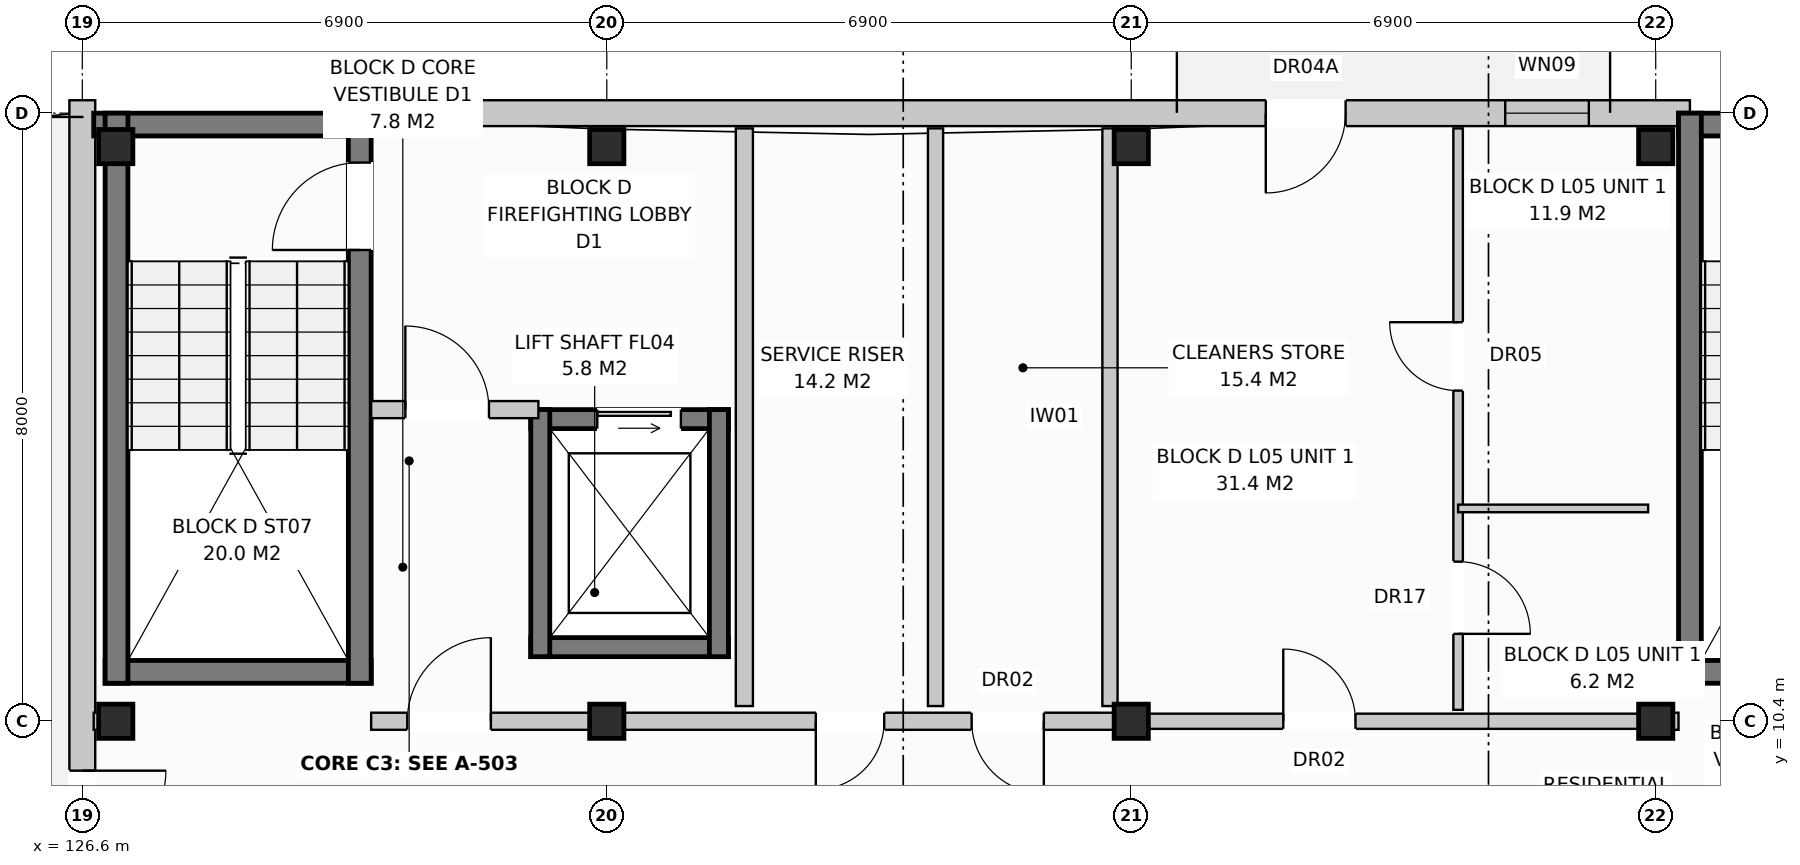
"""IFC4 building model, lengths in metres.
Left out: names, types, materials, properties, quantities, classifications, styles, units other than length and angle.
Written with IfcOpenShell. Run it as: python <this file> out.ifc"""

import sys

from ifc_helpers import new_model, si_unit, direction, frame, frame_2d, origin, origin_with_axes, origin_2d, place, context, subcontext, project, spatial, rectangle, extrude, element, fill, save


model = new_model("IFC4")
c1 = context("Model", 3, precision=1e-05, world=origin(), true_north=direction((0.0, 1.0)))
c2 = subcontext(c1, "Body", "Model", "MODEL_VIEW")
j1 = project(units=[si_unit("LENGTHUNIT", "METRE"), si_unit("PLANEANGLEUNIT", "RADIAN")], contexts=[c1])
p1 = place(None, origin())
s1 = spatial("IfcSite", under=j1, at=p1, CompositionType="ELEMENT")
p2 = place(p1, origin())
s2 = spatial("IfcBuilding", under=s1, at=p2, CompositionType="ELEMENT")
p3 = place(p2, frame((0.0, 0.0, 17.6)))
s3 = spatial("IfcBuildingStorey", under=s2, at=p3, CompositionType="ELEMENT", Elevation=17.6)
for number, where, z_axis, x_axis in (
    (1, (127.04, 10.4, 0.0), (0.0, 0.0, 1.0), (1.0, 0.0, 0.0)),
    (2, (127.04, 17.96, 0.0), (0.0, 0.0, 1.0), (1.0, 0.0, 0.0)),
    (3, (133.5, 10.4, 0.0), (0.0, 0.0, 1.0), (1.0, 0.0, 0.0)),
    (4, (133.5, 17.96, 0.0), (0.0, 0.0, 1.0), (1.0, 0.0, 0.0)),
    (5, (140.4, 10.4, 0.0), (0.0, 0.0, 1.0), (1.0, 0.0, 0.0)),
    (6, (140.4, 17.96, 0.0), (0.0, 0.0, 1.0), (1.0, 0.0, 0.0)),
    (7, (147.3, 10.4, 0.0), (0.0, 0.0, 1.0), (1.0, 0.0, 0.0)),
    (8, (147.3, 17.96, 0.0), (0.0, 0.0, 1.0), (1.0, 0.0, 0.0)),
):
    element("IfcColumn", number, at=place(p3, frame(where, z_axis=z_axis, x_axis=x_axis)), inside=s3, PredefinedType="COLUMN", context=c2, shape_type="SweptSolid", body=[
        extrude(rectangle(XDim=0.45, YDim=0.45, at=origin_2d()), origin(), (0.0, 0.0, 1.0), 3.2),
    ])
p4 = place(p3, frame((130.25, 18.4, 0.0), z_axis=(0.0, 0.0, 1.0), x_axis=(1.0, 0.0, 0.0)))
e9 = element("IfcWall", 9, at=p4, inside=s3, PredefinedType="STANDARD", context=c2, shape_type="SweptSolid", body=[
    extrude(rectangle(XDim=17.5, YDim=0.34, at=frame_2d((8.75, 0.0))), origin(), (0.0, 0.0, 1.0), 2.95),
])
p5 = place(p4, frame((11.92, 0.0, 0.0)))
e10 = element("IfcOpeningElement", 10, at=p5, cuts=e9, PredefinedType="OPENING", context=c2, shape_type="SweptSolid", body=[
    extrude(rectangle(XDim=1.05, YDim=2.12, at=frame_2d((0.525, 1.06))), frame((0.0, 0.182, 0.0), z_axis=(0.0, -1.0, 0.0), x_axis=(1.0, 0.0, 0.0)), (0.0, 0.0, 1.0), 0.364),
])
p6 = place(p4, frame((15.07, 0.0, 0.72)))
e11 = element("IfcOpeningElement", 11, at=p6, cuts=e9, PredefinedType="OPENING", context=c2, shape_type="SweptSolid", body=[
    extrude(rectangle(XDim=1.1, YDim=1.5, at=frame_2d((0.55, 0.75))), frame((0.0, 0.182, 0.0), z_axis=(0.0, -1.0, 0.0), x_axis=(1.0, 0.0, 0.0)), (0.0, 0.0, 1.0), 0.364),
])
p7 = place(p3, frame((126.6, -0.17, 0.0), z_axis=(0.0, 0.0, 1.0), x_axis=(0.0, 1.0, 0.0)))
e12 = element("IfcWall", 12, at=p7, inside=s3, PredefinedType="STANDARD", context=c2, shape_type="SweptSolid", body=[
    extrude(rectangle(XDim=18.74, YDim=0.34, at=frame_2d((9.37, 0.0))), origin(), (0.0, 0.0, 1.0), 2.95),
])
p8 = place(p7, frame((8.82, 0.0, 0.0)))
e13 = element("IfcOpeningElement", 13, at=p8, cuts=e12, PredefinedType="OPENING", context=c2, shape_type="SweptSolid", body=[
    extrude(rectangle(XDim=1.1, YDim=2.1, at=frame_2d((0.55, 1.05))), frame((0.0, 0.182, 0.0), z_axis=(0.0, -1.0, 0.0), x_axis=(1.0, 0.0, 0.0)), (0.0, 0.0, 1.0), 0.364),
])
p9 = place(p7, frame((1.82, 0.0, 0.0)))
e14 = element("IfcOpeningElement", 14, at=p9, cuts=e12, PredefinedType="OPENING", context=c2, shape_type="SweptSolid", body=[
    extrude(rectangle(XDim=1.1, YDim=2.1, at=frame_2d((0.55, 1.05))), frame((0.0, 0.182, 0.0), z_axis=(0.0, -1.0, 0.0), x_axis=(1.0, 0.0, 0.0)), (0.0, 0.0, 1.0), 0.364),
])
p10 = place(p3, frame((126.75, 18.25, 0.0), z_axis=(0.0, 0.0, 1.0), x_axis=(1.0, 0.0, 0.0)))
e15 = element("IfcWall", 15, at=p10, inside=s3, PredefinedType="SHEAR", context=c2, shape_type="SweptSolid", body=[
    extrude(rectangle(XDim=3.65, YDim=0.3, at=frame_2d((1.825, 0.0))), origin(), (0.0, 0.0, 1.0), 2.95),
])
p11 = place(p3, frame((126.9, 11.05, 0.0), z_axis=(0.0, 0.0, 1.0), x_axis=(1.0, 0.0, 0.0)))
e16 = element("IfcWall", 16, at=p11, inside=s3, PredefinedType="SHEAR", context=c2, shape_type="SweptSolid", body=[
    extrude(rectangle(XDim=3.5, YDim=0.3, at=frame_2d((1.75, 0.0))), origin(), (0.0, 0.0, 1.0), 2.95),
])
p12 = place(p3, frame((127.05, 10.9, 0.0), z_axis=(0.0, 0.0, 1.0), x_axis=(0.0, 1.0, 0.0)))
e17 = element("IfcWall", 17, at=p12, inside=s3, PredefinedType="SHEAR", context=c2, shape_type="SweptSolid", body=[
    extrude(rectangle(XDim=7.5, YDim=0.3, at=frame_2d((3.75, 0.0))), origin(), (0.0, 0.0, 1.0), 2.95),
])
p13 = place(p3, frame((130.25, 10.9, 0.0), z_axis=(0.0, 0.0, 1.0), x_axis=(0.0, 1.0, 0.0)))
e18 = element("IfcWall", 18, at=p13, inside=s3, PredefinedType="SHEAR", context=c2, shape_type="SweptSolid", body=[
    extrude(rectangle(XDim=7.5, YDim=0.3, at=frame_2d((3.75, 0.0))), origin(), (0.0, 0.0, 1.0), 2.95),
])
p14 = place(p13, frame((5.7, 0.0, 0.0)))
e19 = element("IfcOpeningElement", 19, at=p14, cuts=e18, PredefinedType="OPENING", context=c2, shape_type="SweptSolid", body=[
    extrude(rectangle(XDim=1.15, YDim=2.15, at=frame_2d((0.575, 1.075))), frame((0.0, 0.162, 0.0), z_axis=(0.0, -1.0, 0.0), x_axis=(1.0, 0.0, 0.0)), (0.0, 0.0, 1.0), 0.324),
])
p15 = place(p3, frame((132.5, 14.375, 0.0), z_axis=(0.0, 0.0, 1.0), x_axis=(1.0, 0.0, 0.0)))
e20 = element("IfcWall", 20, at=p15, inside=s3, PredefinedType="SHEAR", context=c2, shape_type="SweptSolid", body=[
    extrude(rectangle(XDim=2.6, YDim=0.25, at=frame_2d((1.3, 0.0))), origin(), (0.0, 0.0, 1.0), 2.95),
])
p16 = place(p15, frame((0.875, 0.0, 0.0)))
e21 = element("IfcOpeningElement", 21, at=p16, cuts=e20, PredefinedType="OPENING", context=c2, shape_type="SweptSolid", body=[
    extrude(rectangle(XDim=1.1, YDim=2.1, at=frame_2d((0.55, 1.05))), frame((0.0, 0.137, 0.0), z_axis=(0.0, -1.0, 0.0), x_axis=(1.0, 0.0, 0.0)), (0.0, 0.0, 1.0), 0.274),
])
p17 = place(p3, frame((132.5, 11.375, 0.0), z_axis=(0.0, 0.0, 1.0), x_axis=(1.0, 0.0, 0.0)))
e22 = element("IfcWall", 22, at=p17, inside=s3, PredefinedType="SHEAR", context=c2, shape_type="SweptSolid", body=[
    extrude(rectangle(XDim=2.6, YDim=0.25, at=frame_2d((1.3, 0.0))), origin(), (0.0, 0.0, 1.0), 2.95),
])
for number, where, z_axis, x_axis in (
    (23, (132.625, 11.25, 0.0), (0.0, 0.0, 1.0), (0.0, 1.0, 0.0)),
    (24, (134.975, 11.25, 0.0), (0.0, 0.0, 1.0), (0.0, 1.0, 0.0)),
):
    element("IfcWall", number, at=place(p3, frame(where, z_axis=z_axis, x_axis=x_axis)), inside=s3, PredefinedType="SHEAR", context=c2, shape_type="SweptSolid", body=[
        extrude(rectangle(XDim=3.25, YDim=0.25, at=frame_2d((1.625, 0.0))), origin(), (0.0, 0.0, 1.0), 2.95),
    ])
p18 = place(p3, frame((135.31, 10.6, 0.0), z_axis=(0.0, 0.0, 1.0), x_axis=(0.0, 1.0, 0.0)))
e25 = element("IfcWall", 25, at=p18, inside=s3, PredefinedType="PARTITIONING", context=c2, shape_type="SweptSolid", body=[
    extrude(rectangle(XDim=7.6, YDim=0.225, at=frame_2d((3.8, 0.0))), origin(), (0.0, 0.0, 1.0), 2.59),
])
p19 = place(p3, frame((130.4, 14.5, 0.0), z_axis=(0.0, 0.0, 1.0), x_axis=(1.0, 0.0, 0.0)))
e26 = element("IfcWall", 26, at=p19, inside=s3, PredefinedType="PARTITIONING", context=c2, shape_type="SweptSolid", body=[
    extrude(rectangle(XDim=2.2, YDim=0.225, at=frame_2d((1.1, 0.0))), origin(), (0.0, 0.0, 1.0), 2.95),
])
p20 = place(p19, frame((0.45, 0.0, 0.0)))
e27 = element("IfcOpeningElement", 27, at=p20, cuts=e26, PredefinedType="OPENING", context=c2, shape_type="SweptSolid", body=[
    extrude(rectangle(XDim=1.1, YDim=2.15, at=frame_2d((0.55, 1.075))), frame((0.0, 0.125, 0.0), z_axis=(0.0, -1.0, 0.0), x_axis=(1.0, 0.0, 0.0)), (0.0, 0.0, 1.0), 0.249),
])
p21 = place(p3, frame((126.75, 10.4, 0.0), z_axis=(0.0, 0.0, 1.0), x_axis=(1.0, 0.0, 0.0)))
e28 = element("IfcWall", 28, at=p21, inside=s3, PredefinedType="PARTITIONING", context=c2, shape_type="SweptSolid", body=[
    extrude(rectangle(XDim=0.15, YDim=0.225, at=frame_2d((0.075, 0.0))), origin(), (0.0, 0.0, 1.0), 2.95),
])
for number, where, z_axis, x_axis in (
    (29, (137.825, 10.6, 0.0), (0.0, 0.0, 1.0), (0.0, 1.0, 0.0)),
    (30, (140.12, 10.6, 0.0), (0.0, 0.0, 1.0), (0.0, 1.0, 0.0)),
):
    element("IfcWall", number, at=place(p3, frame(where, z_axis=z_axis, x_axis=x_axis)), inside=s3, PredefinedType="PARTITIONING", context=c2, shape_type="SweptSolid", body=[
        extrude(rectangle(XDim=7.6, YDim=0.2, at=frame_2d((3.8, 0.0))), origin(), (0.0, 0.0, 1.0), 2.95),
    ])
p22 = place(p3, frame((130.4, 10.4, 0.0), z_axis=(0.0, 0.0, 1.0), x_axis=(1.0, 0.0, 0.0)))
e31 = element("IfcWall", 31, at=p22, inside=s3, PredefinedType="PARTITIONING", context=c2, shape_type="SweptSolid", body=[
    extrude(rectangle(XDim=10.0, YDim=0.225, at=frame_2d((5.0, 0.0))), origin(), (0.0, 0.0, 1.0), 2.39),
])
p23 = place(p22, frame((0.475, 0.0, 0.0)))
e32 = element("IfcOpeningElement", 32, at=p23, cuts=e31, PredefinedType="OPENING", context=c2, shape_type="SweptSolid", body=[
    extrude(rectangle(XDim=1.1, YDim=2.15, at=frame_2d((0.55, 1.075))), frame((0.0, 0.125, 0.0), z_axis=(0.0, -1.0, 0.0), x_axis=(1.0, 0.0, 0.0)), (0.0, 0.0, 1.0), 0.249),
])
p24 = place(p22, frame((5.85, 0.0, 0.0)))
e33 = element("IfcOpeningElement", 33, at=p24, cuts=e31, PredefinedType="OPENING", context=c2, shape_type="SweptSolid", body=[
    extrude(rectangle(XDim=0.9, YDim=2.1, at=frame_2d((0.45, 1.05))), frame((0.0, 0.125, 0.0), z_axis=(0.0, -1.0, 0.0), x_axis=(1.0, 0.0, 0.0)), (0.0, 0.0, 1.0), 0.249),
])
p25 = place(p22, frame((7.9, 0.0, 0.0)))
e34 = element("IfcOpeningElement", 34, at=p25, cuts=e31, PredefinedType="OPENING", context=c2, shape_type="SweptSolid", body=[
    extrude(rectangle(XDim=0.95, YDim=2.15, at=frame_2d((0.475, 1.075))), frame((0.0, 0.125, 0.0), z_axis=(0.0, -1.0, 0.0), x_axis=(1.0, 0.0, 0.0)), (0.0, 0.0, 1.0), 0.249),
])
for number, where, z_axis, x_axis in (
    (35, (147.6, 18.25, 0.0), (0.0, 0.0, 1.0), (1.0, 0.0, 0.0)),
    (36, (147.6, 11.05, 0.0), (0.0, 0.0, 1.0), (1.0, 0.0, 0.0)),
):
    element("IfcWall", number, at=place(p3, frame(where, z_axis=z_axis, x_axis=x_axis)), inside=s3, PredefinedType="SHEAR", context=c2, shape_type="SweptSolid", body=[
        extrude(rectangle(XDim=3.5, YDim=0.3, at=frame_2d((1.75, 0.0))), origin(), (0.0, 0.0, 1.0), 2.95),
    ])
p26 = place(p3, frame((147.75, 10.9, 0.0), z_axis=(0.0, 0.0, 1.0), x_axis=(0.0, 1.0, 0.0)))
e37 = element("IfcWall", 37, at=p26, inside=s3, PredefinedType="SHEAR", context=c2, shape_type="SweptSolid", body=[
    extrude(rectangle(XDim=7.5, YDim=0.3, at=frame_2d((3.75, 0.0))), origin(), (0.0, 0.0, 1.0), 2.95),
])
p27 = place(p3, frame((147.3, 10.4, 0.0), z_axis=(0.0, 0.0, 1.0), x_axis=(1.0, 0.0, 0.0)))
e38 = element("IfcWall", 38, at=p27, inside=s3, PredefinedType="PARTITIONING", context=c2, shape_type="SweptSolid", body=[
    extrude(rectangle(XDim=0.3, YDim=0.225, at=frame_2d((0.15, 0.0))), origin(), (0.0, 0.0, 1.0), 2.95),
])
p28 = place(p3, frame((140.4, 10.4, 0.0), z_axis=(0.0, 0.0, 1.0), x_axis=(1.0, 0.0, 0.0)))
e39 = element("IfcWall", 39, at=p28, inside=s3, PredefinedType="PARTITIONING", context=c2, shape_type="SweptSolid", body=[
    extrude(rectangle(XDim=6.9, YDim=0.2, at=frame_2d((3.45, 0.0))), origin(), (0.0, 0.0, 1.0), 2.39),
])
p29 = place(p28, frame((2.0, 0.0, 0.0)))
e40 = element("IfcOpeningElement", 40, at=p29, cuts=e39, PredefinedType="OPENING", context=c2, shape_type="SweptSolid", body=[
    extrude(rectangle(XDim=0.95, YDim=2.15, at=frame_2d((0.475, 1.075))), frame((0.0, 0.112, 0.0), z_axis=(0.0, -1.0, 0.0), x_axis=(1.0, 0.0, 0.0)), (0.0, 0.0, 1.0), 0.224),
])
p30 = place(p3, frame((144.7, 10.55, 0.0), z_axis=(0.0, 0.0, 1.0), x_axis=(0.0, 1.0, 0.0)))
e41 = element("IfcWall", 41, at=p30, inside=s3, PredefinedType="PARTITIONING", context=c2, shape_type="SweptSolid", body=[
    extrude(rectangle(XDim=7.65, YDim=0.125, at=frame_2d((3.825, 0.0))), origin(), (0.0, 0.0, 1.0), 2.95),
])
p31 = place(p30, frame((1.0, 0.0, 0.0)))
e42 = element("IfcOpeningElement", 42, at=p31, cuts=e41, PredefinedType="OPENING", context=c2, shape_type="SweptSolid", body=[
    extrude(rectangle(XDim=0.95, YDim=2.1, at=frame_2d((0.475, 1.05))), frame((0.0, 0.074, 0.0), z_axis=(0.0, -1.0, 0.0), x_axis=(1.0, 0.0, 0.0)), (0.0, 0.0, 1.0), 0.149),
])
p32 = place(p30, frame((4.2, 0.0, 0.0)))
e43 = element("IfcOpeningElement", 43, at=p32, cuts=e41, PredefinedType="OPENING", context=c2, shape_type="SweptSolid", body=[
    extrude(rectangle(XDim=0.9, YDim=2.1, at=frame_2d((0.45, 1.05))), frame((0.0, 0.074, 0.0), z_axis=(0.0, -1.0, 0.0), x_axis=(1.0, 0.0, 0.0)), (0.0, 0.0, 1.0), 0.149),
])
p33 = place(p3, frame((144.7, 13.2, 0.0), z_axis=(0.0, 0.0, 1.0), x_axis=(1.0, 0.0, 0.0)))
e44 = element("IfcWall", 44, at=p33, inside=s3, PredefinedType="PARTITIONING", context=c2, shape_type="SweptSolid", body=[
    extrude(rectangle(XDim=2.5, YDim=0.1, at=frame_2d((1.25, 0.0))), origin(), (0.0, 0.0, 1.0), 2.95),
])
p34 = place(p5, frame((1.05, 0.0, 0.0), z_axis=(0.0, 0.0, 1.0), x_axis=(-1.0, 0.0, 0.0)))
e45 = element("IfcDoor", 45, at=p34, inside=s3, OperationType="SINGLE_SWING_LEFT", PredefinedType="DOOR", context=c2, shape_type="SweptSolid", body=[
    extrude(rectangle(XDim=1.05, YDim=2.12, at=frame_2d((0.525, 1.06))), frame((0.0, 0.025, 0.0), z_axis=(0.0, -1.0, 0.0), x_axis=(1.0, 0.0, 0.0)), (0.0, 0.0, 1.0), 0.05),
])
fill(e10, e45)
p35 = place(p6, origin_with_axes())
e46 = element("IfcWindow", 46, at=p35, inside=s3, PartitioningType="SINGLE_PANEL", PredefinedType="WINDOW", context=c2, shape_type="SweptSolid", body=[
    extrude(rectangle(XDim=1.1, YDim=1.5, at=frame_2d((0.55, 0.75))), frame((0.0, 0.03, 0.0), z_axis=(0.0, -1.0, 0.0), x_axis=(1.0, 0.0, 0.0)), (0.0, 0.0, 1.0), 0.06),
])
fill(e11, e46)
p36 = place(p8, frame((1.1, 0.0, 0.0), z_axis=(0.0, 0.0, 1.0), x_axis=(-1.0, 0.0, 0.0)))
e47 = element("IfcDoor", 47, at=p36, inside=s3, OperationType="SINGLE_SWING_RIGHT", PredefinedType="DOOR", context=c2, shape_type="SweptSolid", body=[
    extrude(rectangle(XDim=1.1, YDim=2.1, at=frame_2d((0.55, 1.05))), frame((0.0, 0.025, 0.0), z_axis=(0.0, -1.0, 0.0), x_axis=(1.0, 0.0, 0.0)), (0.0, 0.0, 1.0), 0.05),
])
fill(e13, e47)
p37 = place(p14, origin_with_axes())
e48 = element("IfcDoor", 48, at=p37, inside=s3, OperationType="SINGLE_SWING_LEFT", PredefinedType="DOOR", context=c2, shape_type="SweptSolid", body=[
    extrude(rectangle(XDim=1.15, YDim=2.15, at=frame_2d((0.575, 1.075))), frame((0.0, 0.025, 0.0), z_axis=(0.0, -1.0, 0.0), x_axis=(1.0, 0.0, 0.0)), (0.0, 0.0, 1.0), 0.05),
])
fill(e19, e48)
p38 = place(p16, origin_with_axes())
e49 = element("IfcDoor", 49, at=p38, inside=s3, OperationType="SLIDING_TO_LEFT", PredefinedType="DOOR", context=c2, shape_type="SweptSolid", body=[
    extrude(rectangle(XDim=1.1, YDim=2.1, at=frame_2d((0.55, 1.05))), frame((0.0, 0.025, 0.0), z_axis=(0.0, -1.0, 0.0), x_axis=(1.0, 0.0, 0.0)), (0.0, 0.0, 1.0), 0.05),
])
fill(e21, e49)
p39 = place(p20, origin_with_axes())
e50 = element("IfcDoor", 50, at=p39, inside=s3, OperationType="SINGLE_SWING_LEFT", PredefinedType="DOOR", context=c2, shape_type="SweptSolid", body=[
    extrude(rectangle(XDim=1.1, YDim=2.15, at=frame_2d((0.55, 1.075))), frame((0.0, 0.025, 0.0), z_axis=(0.0, -1.0, 0.0), x_axis=(1.0, 0.0, 0.0)), (0.0, 0.0, 1.0), 0.05),
])
fill(e27, e50)
p40 = place(p23, origin_with_axes())
e51 = element("IfcDoor", 51, at=p40, inside=s3, OperationType="SINGLE_SWING_RIGHT", PredefinedType="DOOR", context=c2, shape_type="SweptSolid", body=[
    extrude(rectangle(XDim=1.1, YDim=2.15, at=frame_2d((0.55, 1.075))), frame((0.0, 0.025, 0.0), z_axis=(0.0, -1.0, 0.0), x_axis=(1.0, 0.0, 0.0)), (0.0, 0.0, 1.0), 0.05),
])
fill(e32, e51)
p41 = place(p24, frame((0.9, 0.0, 0.0), z_axis=(0.0, 0.0, 1.0), x_axis=(-1.0, 0.0, 0.0)))
e52 = element("IfcDoor", 52, at=p41, inside=s3, OperationType="SINGLE_SWING_LEFT", PredefinedType="DOOR", context=c2, shape_type="SweptSolid", body=[
    extrude(rectangle(XDim=0.9, YDim=2.1, at=frame_2d((0.45, 1.05))), frame((0.0, 0.025, 0.0), z_axis=(0.0, -1.0, 0.0), x_axis=(1.0, 0.0, 0.0)), (0.0, 0.0, 1.0), 0.05),
])
fill(e33, e52)
p42 = place(p25, frame((0.95, 0.0, 0.0), z_axis=(0.0, 0.0, 1.0), x_axis=(-1.0, 0.0, 0.0)))
e53 = element("IfcDoor", 53, at=p42, inside=s3, OperationType="SINGLE_SWING_RIGHT", PredefinedType="DOOR", context=c2, shape_type="SweptSolid", body=[
    extrude(rectangle(XDim=0.95, YDim=2.15, at=frame_2d((0.475, 1.075))), frame((0.0, 0.025, 0.0), z_axis=(0.0, -1.0, 0.0), x_axis=(1.0, 0.0, 0.0)), (0.0, 0.0, 1.0), 0.05),
])
fill(e34, e53)
p43 = place(p29, origin_with_axes())
e54 = element("IfcDoor", 54, at=p43, inside=s3, OperationType="SINGLE_SWING_LEFT", PredefinedType="DOOR", context=c2, shape_type="SweptSolid", body=[
    extrude(rectangle(XDim=0.95, YDim=2.15, at=frame_2d((0.475, 1.075))), frame((0.0, 0.025, 0.0), z_axis=(0.0, -1.0, 0.0), x_axis=(1.0, 0.0, 0.0)), (0.0, 0.0, 1.0), 0.05),
])
fill(e40, e54)
p44 = place(p31, frame((0.95, 0.0, 0.0), z_axis=(0.0, 0.0, 1.0), x_axis=(-1.0, 0.0, 0.0)))
e55 = element("IfcDoor", 55, at=p44, inside=s3, OperationType="SINGLE_SWING_LEFT", PredefinedType="DOOR", context=c2, shape_type="SweptSolid", body=[
    extrude(rectangle(XDim=0.95, YDim=2.1, at=frame_2d((0.475, 1.05))), frame((0.0, 0.025, 0.0), z_axis=(0.0, -1.0, 0.0), x_axis=(1.0, 0.0, 0.0)), (0.0, 0.0, 1.0), 0.05),
])
fill(e42, e55)
p45 = place(p32, origin_with_axes())
e56 = element("IfcDoor", 56, at=p45, inside=s3, OperationType="SINGLE_SWING_RIGHT", PredefinedType="DOOR", context=c2, shape_type="SweptSolid", body=[
    extrude(rectangle(XDim=0.9, YDim=2.1, at=frame_2d((0.45, 1.05))), frame((0.0, 0.025, 0.0), z_axis=(0.0, -1.0, 0.0), x_axis=(1.0, 0.0, 0.0)), (0.0, 0.0, 1.0), 0.05),
])
fill(e43, e56)
save(model, sys.argv[1])
